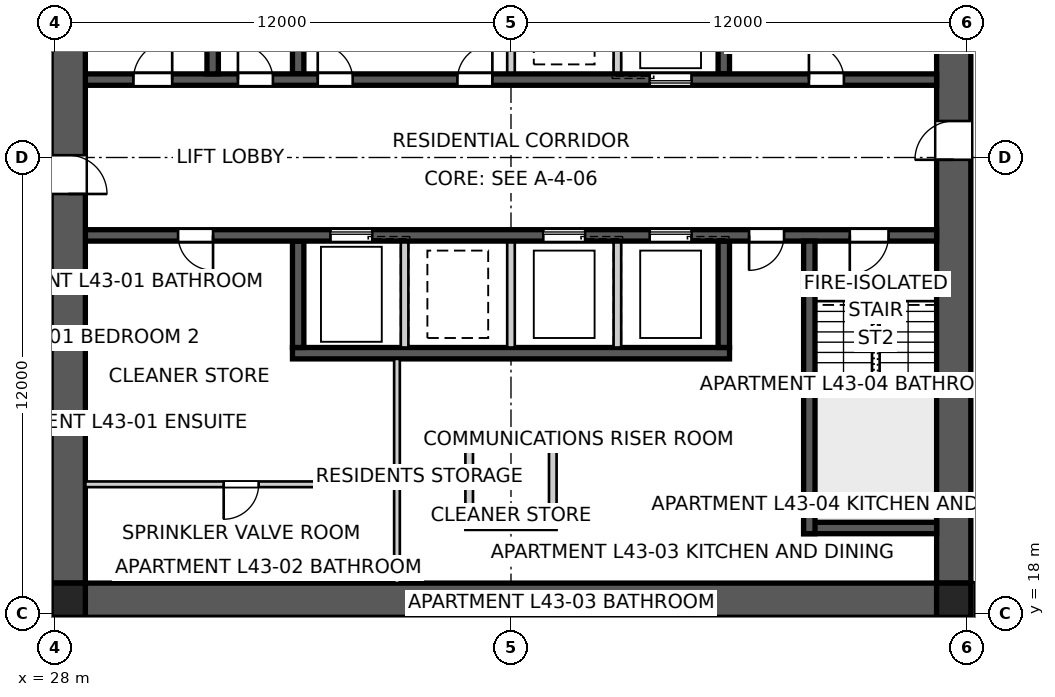
"""IFC4 building model, lengths in metres.
Left out: names, types, materials, properties, quantities, classifications, styles, units other than length and angle.
Written with IfcOpenShell. Run it as: python <this file> out.ifc"""

import sys

from ifc_helpers import new_model, si_unit, direction, frame, frame_2d, origin, origin_2d, place, context, subcontext, project, spatial, polyline, rectangle, outline, extrude, element, fill, save


model = new_model("IFC4")
c1 = context("Model", 3, precision=1e-05, world=origin(), true_north=direction((0.0, 1.0)))
c2 = subcontext(c1, "Body", "Model", "MODEL_VIEW")
j1 = project(units=[si_unit("LENGTHUNIT", "METRE"), si_unit("PLANEANGLEUNIT", "RADIAN")], contexts=[c1])
p1 = place(None, origin())
s1 = spatial("IfcSite", under=j1, at=p1, CompositionType="ELEMENT")
p2 = place(p1, origin())
s2 = spatial("IfcBuilding", under=s1, at=p2, CompositionType="ELEMENT")
p3 = place(p2, frame((0.0, 0.0, 157.4)))
s3 = spatial("IfcBuildingStorey", under=s2, at=p3, CompositionType="ELEMENT", Elevation=157.4)
p4 = place(p3, frame((51.2, 18.35, 0.0), z_axis=(0.0, 0.0, 1.0), x_axis=(-1.0, 0.0, 0.0)))
e1 = element("IfcWall", 1, at=p4, inside=s3, PredefinedType="SHEAR", context=c2, shape_type="SweptSolid", body=[
    extrude(outline(polyline([(0.0, -0.45), (22.4, -0.45), (22.4, -0.025), (22.85, -0.025), (22.85, 0.025), (22.4, 0.025), (22.4, 0.45), (0.0, 0.45), (0.0, 0.025), (-0.45, 0.025), (-0.45, -0.025), (0.0, -0.025), (0.0, -0.45)])), origin(), (0.0, 0.0, 1.0), 3.4),
])
p5 = place(p3, frame((51.65, 18.8, 0.0), z_axis=(0.0, 0.0, 1.0), x_axis=(0.0, 1.0, 0.0)))
e2 = element("IfcWall", 2, at=p5, inside=s3, PredefinedType="SHEAR", context=c2, shape_type="SweptSolid", body=[
    extrude(outline(polyline([(0.0, -0.45), (22.4, -0.45), (22.4, -0.025), (22.85, -0.025), (22.85, 0.025), (22.4, 0.025), (22.4, 0.45), (0.0, 0.45), (0.0, 0.025), (-0.45, 0.025), (-0.45, -0.025), (0.0, -0.025), (0.0, -0.45)])), origin(), (0.0, 0.0, 1.0), 3.4),
])
p6 = place(p5, frame((11.14, 0.0, 0.0)))
e3 = element("IfcOpeningElement", 3, at=p6, cuts=e2, PredefinedType="OPENING", context=c2, shape_type="SweptSolid", body=[
    extrude(rectangle(XDim=1.02, YDim=2.4, at=frame_2d((0.51, 1.2))), frame((0.0, 0.46, 0.0), z_axis=(0.0, -1.0, 0.0), x_axis=(1.0, 0.0, 0.0)), (0.0, 0.0, 1.0), 0.92),
])
p7 = place(p3, frame((28.35, 41.2, 0.0), z_axis=(0.0, 0.0, 1.0), x_axis=(0.0, -1.0, 0.0)))
e4 = element("IfcWall", 4, at=p7, inside=s3, PredefinedType="SHEAR", context=c2, shape_type="SweptSolid", body=[
    extrude(outline(polyline([(0.0, -0.45), (22.4, -0.45), (22.4, -0.025), (22.85, -0.025), (22.85, 0.025), (22.4, 0.025), (22.4, 0.45), (0.0, 0.45), (0.0, 0.025), (-0.45, 0.025), (-0.45, -0.025), (0.0, -0.025), (0.0, -0.45)])), origin(), (0.0, 0.0, 1.0), 3.4),
])
p8 = place(p7, frame((11.14, 0.0, 0.0)))
e5 = element("IfcOpeningElement", 5, at=p8, cuts=e4, PredefinedType="OPENING", context=c2, shape_type="SweptSolid", body=[
    extrude(rectangle(XDim=1.02, YDim=2.4, at=frame_2d((0.51, 1.2))), frame((0.0, 0.46, 0.0), z_axis=(0.0, -1.0, 0.0), x_axis=(1.0, 0.0, 0.0)), (0.0, 0.0, 1.0), 0.92),
])
p9 = place(p3, frame((28.8, 32.05, 0.0), z_axis=(0.0, 0.0, 1.0), x_axis=(1.0, 0.0, 0.0)))
e6 = element("IfcWall", 6, at=p9, inside=s3, PredefinedType="SHEAR", context=c2, shape_type="SweptSolid", body=[
    extrude(rectangle(XDim=22.4, YDim=0.3, at=frame_2d((11.2, 0.0))), origin(), (0.0, 0.0, 1.0), 3.4),
])
p10 = place(p9, frame((19.04, 0.0, 0.0)))
e7 = element("IfcOpeningElement", 7, at=p10, cuts=e6, PredefinedType="OPENING", context=c2, shape_type="SweptSolid", body=[
    extrude(rectangle(XDim=0.92, YDim=2.1, at=frame_2d((0.46, 1.05))), frame((0.0, 0.16, 0.0), z_axis=(0.0, -1.0, 0.0), x_axis=(1.0, 0.0, 0.0)), (0.0, 0.0, 1.0), 0.32),
])
p11 = place(p9, frame((1.265, 0.0, 0.0)))
e8 = element("IfcOpeningElement", 8, at=p11, cuts=e6, PredefinedType="OPENING", context=c2, shape_type="SweptSolid", body=[
    extrude(rectangle(XDim=1.02, YDim=2.1, at=frame_2d((0.51, 1.05))), frame((0.0, 0.16, 0.0), z_axis=(0.0, -1.0, 0.0), x_axis=(1.0, 0.0, 0.0)), (0.0, 0.0, 1.0), 0.32),
])
p12 = place(p9, frame((4.015, 0.0, 0.0)))
e9 = element("IfcOpeningElement", 9, at=p12, cuts=e6, PredefinedType="OPENING", context=c2, shape_type="SweptSolid", body=[
    extrude(rectangle(XDim=0.92, YDim=2.1, at=frame_2d((0.46, 1.05))), frame((0.0, 0.16, 0.0), z_axis=(0.0, -1.0, 0.0), x_axis=(1.0, 0.0, 0.0)), (0.0, 0.0, 1.0), 0.32),
])
p13 = place(p9, frame((6.115, 0.0, 0.0)))
e10 = element("IfcOpeningElement", 10, at=p13, cuts=e6, PredefinedType="OPENING", context=c2, shape_type="SweptSolid", body=[
    extrude(rectangle(XDim=0.92, YDim=2.1, at=frame_2d((0.46, 1.05))), frame((0.0, 0.16, 0.0), z_axis=(0.0, -1.0, 0.0), x_axis=(1.0, 0.0, 0.0)), (0.0, 0.0, 1.0), 0.32),
])
p14 = place(p9, frame((9.79, 0.0, 0.0)))
e11 = element("IfcOpeningElement", 11, at=p14, cuts=e6, PredefinedType="OPENING", context=c2, shape_type="SweptSolid", body=[
    extrude(rectangle(XDim=0.92, YDim=2.1, at=frame_2d((0.46, 1.05))), frame((0.0, 0.16, 0.0), z_axis=(0.0, -1.0, 0.0), x_axis=(1.0, 0.0, 0.0)), (0.0, 0.0, 1.0), 0.32),
])
p15 = place(p9, frame((14.85, 0.0, 0.0)))
e12 = element("IfcOpeningElement", 12, at=p15, cuts=e6, PredefinedType="OPENING", context=c2, shape_type="SweptSolid", body=[
    extrude(rectangle(XDim=1.1, YDim=2.1, at=frame_2d((0.55, 1.05))), frame((0.0, 0.16, 0.0), z_axis=(0.0, -1.0, 0.0), x_axis=(1.0, 0.0, 0.0)), (0.0, 0.0, 1.0), 0.32),
])
p16 = place(p3, frame((51.2, 27.95, 0.0), z_axis=(0.0, 0.0, 1.0), x_axis=(-1.0, 0.0, 0.0)))
e13 = element("IfcWall", 13, at=p16, inside=s3, PredefinedType="SHEAR", context=c2, shape_type="SweptSolid", body=[
    extrude(rectangle(XDim=22.4, YDim=0.3, at=frame_2d((11.2, 0.0))), origin(), (0.0, 0.0, 1.0), 3.4),
])
p17 = place(p16, frame((19.04, 0.0, 0.0)))
e14 = element("IfcOpeningElement", 14, at=p17, cuts=e13, PredefinedType="OPENING", context=c2, shape_type="SweptSolid", body=[
    extrude(rectangle(XDim=0.92, YDim=2.1, at=frame_2d((0.46, 1.05))), frame((0.0, 0.16, 0.0), z_axis=(0.0, -1.0, 0.0), x_axis=(1.0, 0.0, 0.0)), (0.0, 0.0, 1.0), 0.32),
])
p18 = place(p16, frame((1.265, 0.0, 0.0)))
e15 = element("IfcOpeningElement", 15, at=p18, cuts=e13, PredefinedType="OPENING", context=c2, shape_type="SweptSolid", body=[
    extrude(rectangle(XDim=1.02, YDim=2.1, at=frame_2d((0.51, 1.05))), frame((0.0, 0.16, 0.0), z_axis=(0.0, -1.0, 0.0), x_axis=(1.0, 0.0, 0.0)), (0.0, 0.0, 1.0), 0.32),
])
p19 = place(p16, frame((4.015, 0.0, 0.0)))
e16 = element("IfcOpeningElement", 16, at=p19, cuts=e13, PredefinedType="OPENING", context=c2, shape_type="SweptSolid", body=[
    extrude(rectangle(XDim=0.92, YDim=2.1, at=frame_2d((0.46, 1.05))), frame((0.0, 0.16, 0.0), z_axis=(0.0, -1.0, 0.0), x_axis=(1.0, 0.0, 0.0)), (0.0, 0.0, 1.0), 0.32),
])
p20 = place(p16, frame((6.45, 0.0, 0.0)))
e17 = element("IfcOpeningElement", 17, at=p20, cuts=e13, PredefinedType="OPENING", context=c2, shape_type="SweptSolid", body=[
    extrude(rectangle(XDim=1.1, YDim=2.1, at=frame_2d((0.55, 1.05))), frame((0.0, 0.16, 0.0), z_axis=(0.0, -1.0, 0.0), x_axis=(1.0, 0.0, 0.0)), (0.0, 0.0, 1.0), 0.32),
])
p21 = place(p16, frame((9.25, 0.0, 0.0)))
e18 = element("IfcOpeningElement", 18, at=p21, cuts=e13, PredefinedType="OPENING", context=c2, shape_type="SweptSolid", body=[
    extrude(rectangle(XDim=1.1, YDim=2.1, at=frame_2d((0.55, 1.05))), frame((0.0, 0.16, 0.0), z_axis=(0.0, -1.0, 0.0), x_axis=(1.0, 0.0, 0.0)), (0.0, 0.0, 1.0), 0.32),
])
p22 = place(p16, frame((14.85, 0.0, 0.0)))
e19 = element("IfcOpeningElement", 19, at=p22, cuts=e13, PredefinedType="OPENING", context=c2, shape_type="SweptSolid", body=[
    extrude(rectangle(XDim=1.1, YDim=2.1, at=frame_2d((0.55, 1.05))), frame((0.0, 0.16, 0.0), z_axis=(0.0, -1.0, 0.0), x_axis=(1.0, 0.0, 0.0)), (0.0, 0.0, 1.0), 0.32),
])
p23 = place(p3, frame((45.75, 24.85, 0.0), z_axis=(0.0, 0.0, 1.0), x_axis=(-1.0, 0.0, 0.0)))
e20 = element("IfcWall", 20, at=p23, inside=s3, PredefinedType="SHEAR", context=c2, shape_type="SweptSolid", body=[
    extrude(rectangle(XDim=11.5, YDim=0.3, at=frame_2d((5.75, 0.0))), origin(), (0.0, 0.0, 1.0), 3.4),
])
for number, where, z_axis, x_axis in (
    (21, (34.4, 32.2, 0.0), (0.0, 0.0, 1.0), (0.0, 1.0, 0.0)),
    (22, (45.6, 27.8, 0.0), (0.0, 0.0, 1.0), (0.0, -1.0, 0.0)),
):
    element("IfcWall", number, at=place(p3, frame(where, z_axis=z_axis, x_axis=x_axis)), inside=s3, PredefinedType="SHEAR", context=c2, shape_type="SweptSolid", body=[
        extrude(rectangle(XDim=2.8, YDim=0.3, at=frame_2d((1.4, 0.0))), origin(), (0.0, 0.0, 1.0), 3.4),
    ])
for number, where, z_axis, x_axis in (
    (23, (42.8, 27.8, 0.0), (0.0, 0.0, 1.0), (0.0, -1.0, 0.0)),
    (24, (40.0, 32.2, 0.0), (0.0, 0.0, 1.0), (0.0, 1.0, 0.0)),
    (25, (40.0, 27.8, 0.0), (0.0, 0.0, 1.0), (0.0, -1.0, 0.0)),
    (26, (42.8, 32.2, 0.0), (0.0, 0.0, 1.0), (0.0, 1.0, 0.0)),
    (27, (37.2, 27.8, 0.0), (0.0, 0.0, 1.0), (0.0, -1.0, 0.0)),
):
    element("IfcWall", number, at=place(p3, frame(where, z_axis=z_axis, x_axis=x_axis)), inside=s3, PredefinedType="SOLIDWALL", context=c2, shape_type="SweptSolid", body=[
        extrude(rectangle(XDim=2.8, YDim=0.2, at=frame_2d((1.4, 0.0))), origin(), (0.0, 0.0, 1.0), 3.4),
    ])
for number, where, z_axis, x_axis in (
    (28, (45.6, 32.2, 0.0), (0.0, 0.0, 1.0), (0.0, 1.0, 0.0)),
    (29, (34.4, 27.8, 0.0), (0.0, 0.0, 1.0), (0.0, -1.0, 0.0)),
):
    element("IfcWall", number, at=place(p3, frame(where, z_axis=z_axis, x_axis=x_axis)), inside=s3, PredefinedType="SHEAR", context=c2, shape_type="SweptSolid", body=[
        extrude(rectangle(XDim=2.8, YDim=0.3, at=frame_2d((1.4, 0.0))), origin(), (0.0, 0.0, 1.0), 3.4),
    ])
for number, where, z_axis, x_axis in (
    (30, (32.15, 32.2, 0.0), (0.0, 0.0, 1.0), (0.0, 1.0, 0.0)),
    (31, (47.85, 27.8, 0.0), (0.0, 0.0, 1.0), (0.0, -1.0, 0.0)),
):
    element("IfcWall", number, at=place(p3, frame(where, z_axis=z_axis, x_axis=x_axis)), inside=s3, PredefinedType="SHEAR", context=c2, shape_type="SweptSolid", body=[
        extrude(rectangle(XDim=7.7, YDim=0.3, at=frame_2d((3.85, 0.0))), origin(), (0.0, 0.0, 1.0), 3.4),
    ])
p24 = place(p3, frame((51.2, 20.25, 0.0), z_axis=(0.0, 0.0, 1.0), x_axis=(-1.0, 0.0, 0.0)))
e32 = element("IfcWall", 32, at=p24, inside=s3, PredefinedType="SHEAR", context=c2, shape_type="SweptSolid", body=[
    extrude(rectangle(XDim=3.5, YDim=0.3, at=frame_2d((1.75, 0.0))), origin(), (0.0, 0.0, 1.0), 3.4),
])
for number, where, z_axis, x_axis in (
    (33, (38.9, 22.4, 0.0), (0.0, 0.0, 1.0), (0.0, -1.0, 0.0)),
    (34, (41.1, 22.4, 0.0), (0.0, 0.0, 1.0), (0.0, -1.0, 0.0)),
):
    element("IfcWall", number, at=place(p3, frame(where, z_axis=z_axis, x_axis=x_axis)), inside=s3, PredefinedType="SOLIDWALL", context=c2, shape_type="SweptSolid", body=[
        extrude(rectangle(XDim=2.0, YDim=0.2, at=frame_2d((1.0, 0.0))), origin(), (0.0, 0.0, 1.0), 3.4),
    ])
for number, where, z_axis, x_axis in (
    (35, (38.8, 22.5, 0.0), (0.0, 0.0, 1.0), (1.0, 0.0, 0.0)),
    (36, (38.8, 20.3, 0.0), (0.0, 0.0, 1.0), (1.0, 0.0, 0.0)),
):
    element("IfcWall", number, at=place(p3, frame(where, z_axis=z_axis, x_axis=x_axis)), inside=s3, PredefinedType="SOLIDWALL", context=c2, shape_type="SweptSolid", body=[
        extrude(rectangle(XDim=2.4, YDim=0.2, at=frame_2d((1.2, 0.0))), origin(), (0.0, 0.0, 1.0), 3.4),
    ])
for number, where, z_axis, x_axis in (
    (37, (28.35, 18.35, 0.0), (0.0, 0.0, 1.0), (1.0, 0.0, 0.0)),
    (38, (51.65, 18.35, 0.0), (0.0, 0.0, 1.0), (1.0, 0.0, 0.0)),
):
    element("IfcColumn", number, at=place(p3, frame(where, z_axis=z_axis, x_axis=x_axis)), inside=s3, PredefinedType="COLUMN", context=c2, shape_type="SweptSolid", body=[
        extrude(rectangle(XDim=0.9, YDim=0.9, at=origin_2d()), origin(), (0.0, 0.0, 1.0), 3.4),
    ])
p25 = place(p3, frame((37.0, 18.8, 0.0), z_axis=(0.0, 0.0, 1.0), x_axis=(0.0, 1.0, 0.0)))
e39 = element("IfcWall", 39, at=p25, inside=s3, PredefinedType="SOLIDWALL", context=c2, shape_type="SweptSolid", body=[
    extrude(rectangle(XDim=5.9, YDim=0.15, at=frame_2d((2.95, 0.0))), origin(), (0.0, 0.0, 1.0), 3.25),
])
p26 = place(p3, frame((37.0, 21.4, 0.0), z_axis=(0.0, 0.0, 1.0), x_axis=(-1.0, 0.0, 0.0)))
e40 = element("IfcWall", 40, at=p26, inside=s3, PredefinedType="SOLIDWALL", context=c2, shape_type="SweptSolid", body=[
    extrude(rectangle(XDim=8.2, YDim=0.15, at=frame_2d((4.1, 0.0))), origin(), (0.0, 0.0, 1.0), 3.25),
])
p27 = place(p26, frame((3.64, 0.0, 0.0)))
e41 = element("IfcOpeningElement", 41, at=p27, cuts=e40, PredefinedType="OPENING", context=c2, shape_type="SweptSolid", body=[
    extrude(rectangle(XDim=0.92, YDim=2.1, at=frame_2d((0.46, 1.05))), frame((0.0, 0.085, 0.0), z_axis=(0.0, -1.0, 0.0), x_axis=(1.0, 0.0, 0.0)), (0.0, 0.0, 1.0), 0.17),
])
p28 = place(p3, frame((27.9, 17.95, 0.0), z_axis=(0.0, 0.0, 1.0), x_axis=(0.0, -1.0, 0.0)))
e42 = element("IfcWall", 42, at=p28, inside=s3, PredefinedType="PARTITIONING", context=c2, shape_type="SweptSolid", body=[
    extrude(rectangle(XDim=2.3, YDim=0.2, at=frame_2d((1.15, 0.0))), origin(), (0.0, 0.0, 1.0), 3.25),
])
p29 = place(p3, frame((52.1, 15.65, 0.0), z_axis=(0.0, 0.0, 1.0), x_axis=(0.0, 1.0, 0.0)))
e43 = element("IfcWall", 43, at=p29, inside=s3, PredefinedType="PARTITIONING", context=c2, shape_type="SweptSolid", body=[
    extrude(rectangle(XDim=3.17, YDim=0.2, at=frame_2d((1.585, 0.0))), origin(), (0.0, 0.0, 1.0), 3.25),
])
p30 = place(p10, origin())
e44 = element("IfcDoor", 44, at=p30, inside=s3, OperationType="SINGLE_SWING_LEFT", PredefinedType="DOOR", context=c2, shape_type="SweptSolid", body=[
    extrude(rectangle(XDim=0.92, YDim=2.1, at=frame_2d((0.46, 1.05))), frame((0.0, 0.025, 0.0), z_axis=(0.0, -1.0, 0.0), x_axis=(1.0, 0.0, 0.0)), (0.0, 0.0, 1.0), 0.05),
])
fill(e7, e44)
p31 = place(p17, origin())
e45 = element("IfcDoor", 45, at=p31, inside=s3, OperationType="SINGLE_SWING_LEFT", PredefinedType="DOOR", context=c2, shape_type="SweptSolid", body=[
    extrude(rectangle(XDim=0.92, YDim=2.1, at=frame_2d((0.46, 1.05))), frame((0.0, 0.025, 0.0), z_axis=(0.0, -1.0, 0.0), x_axis=(1.0, 0.0, 0.0)), (0.0, 0.0, 1.0), 0.05),
])
fill(e14, e45)
p32 = place(p18, origin())
e46 = element("IfcDoor", 46, at=p32, inside=s3, OperationType="SINGLE_SWING_RIGHT", PredefinedType="DOOR", context=c2, shape_type="SweptSolid", body=[
    extrude(rectangle(XDim=1.02, YDim=2.1, at=frame_2d((0.51, 1.05))), frame((0.0, 0.025, 0.0), z_axis=(0.0, -1.0, 0.0), x_axis=(1.0, 0.0, 0.0)), (0.0, 0.0, 1.0), 0.05),
])
fill(e15, e46)
p33 = place(p11, origin())
e47 = element("IfcDoor", 47, at=p33, inside=s3, OperationType="SINGLE_SWING_RIGHT", PredefinedType="DOOR", context=c2, shape_type="SweptSolid", body=[
    extrude(rectangle(XDim=1.02, YDim=2.1, at=frame_2d((0.51, 1.05))), frame((0.0, 0.025, 0.0), z_axis=(0.0, -1.0, 0.0), x_axis=(1.0, 0.0, 0.0)), (0.0, 0.0, 1.0), 0.05),
])
fill(e8, e47)
p34 = place(p12, origin())
e48 = element("IfcDoor", 48, at=p34, inside=s3, OperationType="SINGLE_SWING_LEFT", PredefinedType="DOOR", context=c2, shape_type="SweptSolid", body=[
    extrude(rectangle(XDim=0.92, YDim=2.1, at=frame_2d((0.46, 1.05))), frame((0.0, 0.025, 0.0), z_axis=(0.0, -1.0, 0.0), x_axis=(1.0, 0.0, 0.0)), (0.0, 0.0, 1.0), 0.05),
])
fill(e9, e48)
p35 = place(p19, origin())
e49 = element("IfcDoor", 49, at=p35, inside=s3, OperationType="SINGLE_SWING_RIGHT", PredefinedType="DOOR", context=c2, shape_type="SweptSolid", body=[
    extrude(rectangle(XDim=0.92, YDim=2.1, at=frame_2d((0.46, 1.05))), frame((0.0, 0.025, 0.0), z_axis=(0.0, -1.0, 0.0), x_axis=(1.0, 0.0, 0.0)), (0.0, 0.0, 1.0), 0.05),
])
fill(e16, e49)
p36 = place(p27, origin())
e50 = element("IfcDoor", 50, at=p36, inside=s3, OperationType="SINGLE_SWING_RIGHT", PredefinedType="DOOR", context=c2, shape_type="SweptSolid", body=[
    extrude(rectangle(XDim=0.92, YDim=2.1, at=frame_2d((0.46, 1.05))), frame((0.0, 0.025, 0.0), z_axis=(0.0, -1.0, 0.0), x_axis=(1.0, 0.0, 0.0)), (0.0, 0.0, 1.0), 0.05),
])
fill(e41, e50)
p37 = place(p13, origin())
e51 = element("IfcDoor", 51, at=p37, inside=s3, OperationType="SINGLE_SWING_LEFT", PredefinedType="DOOR", context=c2, shape_type="SweptSolid", body=[
    extrude(rectangle(XDim=0.92, YDim=2.1, at=frame_2d((0.46, 1.05))), frame((0.0, 0.025, 0.0), z_axis=(0.0, -1.0, 0.0), x_axis=(1.0, 0.0, 0.0)), (0.0, 0.0, 1.0), 0.05),
])
fill(e10, e51)
p38 = place(p14, origin())
e52 = element("IfcDoor", 52, at=p38, inside=s3, OperationType="SINGLE_SWING_RIGHT", PredefinedType="DOOR", context=c2, shape_type="SweptSolid", body=[
    extrude(rectangle(XDim=0.92, YDim=2.1, at=frame_2d((0.46, 1.05))), frame((0.0, 0.025, 0.0), z_axis=(0.0, -1.0, 0.0), x_axis=(1.0, 0.0, 0.0)), (0.0, 0.0, 1.0), 0.05),
])
fill(e11, e52)
p39 = place(p6, origin())
e53 = element("IfcDoor", 53, at=p39, inside=s3, OperationType="SINGLE_SWING_LEFT", PredefinedType="DOOR", context=c2, shape_type="SweptSolid", body=[
    extrude(rectangle(XDim=1.02, YDim=2.4, at=frame_2d((0.51, 1.2))), frame((0.0, 0.025, 0.0), z_axis=(0.0, -1.0, 0.0), x_axis=(1.0, 0.0, 0.0)), (0.0, 0.0, 1.0), 0.05),
])
fill(e3, e53)
p40 = place(p8, origin())
e54 = element("IfcDoor", 54, at=p40, inside=s3, OperationType="SINGLE_SWING_RIGHT", PredefinedType="DOOR", context=c2, shape_type="SweptSolid", body=[
    extrude(rectangle(XDim=1.02, YDim=2.4, at=frame_2d((0.51, 1.2))), frame((0.0, 0.025, 0.0), z_axis=(0.0, -1.0, 0.0), x_axis=(1.0, 0.0, 0.0)), (0.0, 0.0, 1.0), 0.05),
])
fill(e5, e54)
p41 = place(p20, origin())
e55 = element("IfcDoor", 55, at=p41, inside=s3, OperationType="SLIDING_TO_LEFT", PredefinedType="DOOR", context=c2, shape_type="SweptSolid", body=[
    extrude(rectangle(XDim=1.1, YDim=2.1, at=frame_2d((0.55, 1.05))), frame((0.0, 0.025, 0.0), z_axis=(0.0, -1.0, 0.0), x_axis=(1.0, 0.0, 0.0)), (0.0, 0.0, 1.0), 0.05),
])
fill(e17, e55)
p42 = place(p21, origin())
e56 = element("IfcDoor", 56, at=p42, inside=s3, OperationType="SLIDING_TO_LEFT", PredefinedType="DOOR", context=c2, shape_type="SweptSolid", body=[
    extrude(rectangle(XDim=1.1, YDim=2.1, at=frame_2d((0.55, 1.05))), frame((0.0, 0.025, 0.0), z_axis=(0.0, -1.0, 0.0), x_axis=(1.0, 0.0, 0.0)), (0.0, 0.0, 1.0), 0.05),
])
fill(e18, e56)
p43 = place(p15, origin())
e57 = element("IfcDoor", 57, at=p43, inside=s3, OperationType="SLIDING_TO_LEFT", PredefinedType="DOOR", context=c2, shape_type="SweptSolid", body=[
    extrude(rectangle(XDim=1.1, YDim=2.1, at=frame_2d((0.55, 1.05))), frame((0.0, 0.025, 0.0), z_axis=(0.0, -1.0, 0.0), x_axis=(1.0, 0.0, 0.0)), (0.0, 0.0, 1.0), 0.05),
])
fill(e12, e57)
p44 = place(p22, origin())
e58 = element("IfcDoor", 58, at=p44, inside=s3, OperationType="SLIDING_TO_LEFT", PredefinedType="DOOR", context=c2, shape_type="SweptSolid", body=[
    extrude(rectangle(XDim=1.1, YDim=2.1, at=frame_2d((0.55, 1.05))), frame((0.0, 0.025, 0.0), z_axis=(0.0, -1.0, 0.0), x_axis=(1.0, 0.0, 0.0)), (0.0, 0.0, 1.0), 0.05),
])
fill(e19, e58)
save(model, sys.argv[1])
